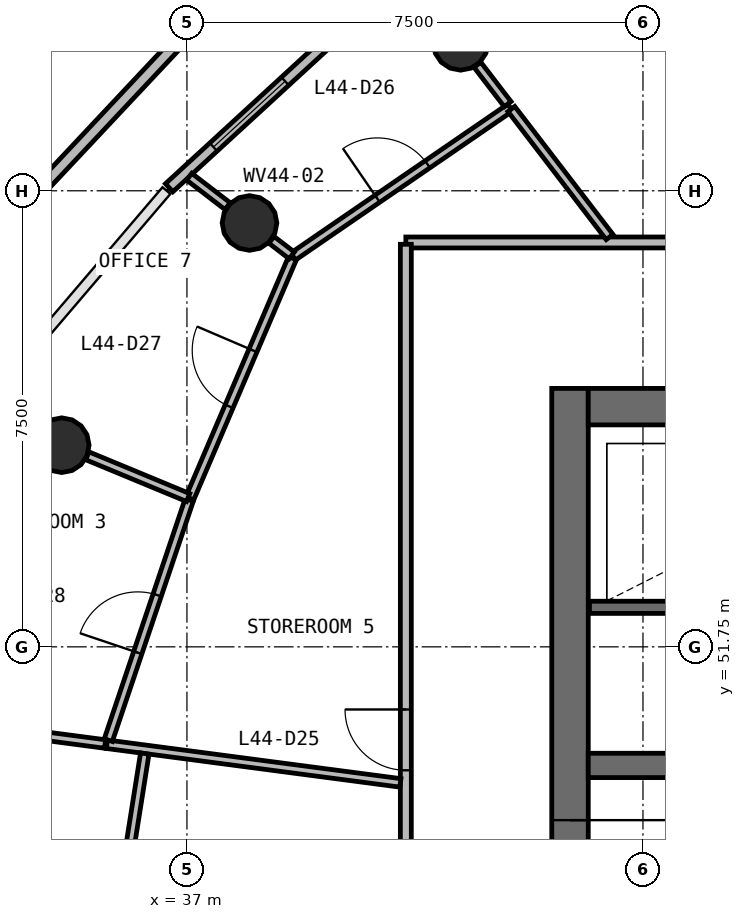
"""IFC4 building model, lengths in metres.
Left out: names, types, materials, properties, quantities, classifications, styles, units other than length and angle.
Written with IfcOpenShell. Run it as: python <this file> out.ifc"""

import sys

from ifc_helpers import new_model, si_unit, direction, frame, frame_2d, origin, origin_2d, place, context, subcontext, project, spatial, rectangle, circle, extrude, source, transform, mapped, element, fill, save


model = new_model("IFC4")
c1 = context("Model", 3, precision=1e-05, world=origin(), true_north=direction((0.0, 1.0)))
c2 = subcontext(c1, "Body", "Model", "MODEL_VIEW")
j1 = project(units=[si_unit("LENGTHUNIT", "METRE"), si_unit("PLANEANGLEUNIT", "RADIAN")], contexts=[c1])
p1 = place(None, origin())
s1 = spatial("IfcSite", under=j1, at=p1, CompositionType="ELEMENT")
p2 = place(p1, origin())
s2 = spatial("IfcBuilding", under=s1, at=p2, CompositionType="ELEMENT")
p3 = place(p2, frame((0.0, 0.0, 183.8)))
s3 = spatial("IfcBuildingStorey", under=s2, at=p3, CompositionType="ELEMENT", Elevation=183.8)
p4 = place(p3, frame((43.3, 56.0, 0.0), z_axis=(0.0, 0.0, 1.0), x_axis=(0.0, -1.0, 0.0)))
e1 = element("IfcWall", 1, at=p4, inside=s3, PredefinedType="SHEAR", context=c2, shape_type="SweptSolid", body=[
    extrude(rectangle(XDim=16.0, YDim=0.6, at=frame_2d((8.0, 0.0))), origin(), (0.0, 0.0, 1.0), 3.9),
])
p5 = place(p4, frame((7.1, 0.0, 0.0)))
e2 = element("IfcOpeningElement", 2, at=p5, cuts=e1, PredefinedType="OPENING", context=c2, shape_type="SweptSolid", body=[
    extrude(rectangle(XDim=1.8, YDim=2.1, at=frame_2d((0.9, 1.05))), frame((0.0, 0.31, 0.0), z_axis=(0.0, -1.0, 0.0), x_axis=(1.0, 0.0, 0.0)), (0.0, 0.0, 1.0), 0.62),
])
p6 = place(p3, frame((60.4, 55.7, 0.0), z_axis=(0.0, 0.0, 1.0), x_axis=(-1.0, 0.0, 0.0)))
e3 = element("IfcWall", 3, at=p6, inside=s3, PredefinedType="SHEAR", context=c2, shape_type="SweptSolid", body=[
    extrude(rectangle(XDim=16.8, YDim=0.6, at=frame_2d((8.4, 0.0))), origin(), (0.0, 0.0, 1.0), 3.9),
])
p7 = place(p6, frame((0.4, 0.0, 0.0)))
e4 = element("IfcOpeningElement", 4, at=p7, cuts=e3, PredefinedType="OPENING", context=c2, shape_type="SweptSolid", body=[
    extrude(rectangle(XDim=1.1, YDim=2.1, at=frame_2d((0.55, 1.05))), frame((0.0, 0.31, 0.0), z_axis=(0.0, -1.0, 0.0), x_axis=(1.0, 0.0, 0.0)), (0.0, 0.0, 1.0), 0.62),
])
p8 = place(p6, frame((10.3, 0.0, 0.0)))
e5 = element("IfcOpeningElement", 5, at=p8, cuts=e3, PredefinedType="OPENING", context=c2, shape_type="SweptSolid", body=[
    extrude(rectangle(XDim=1.2, YDim=2.1, at=frame_2d((0.6, 1.05))), frame((0.0, 0.31, 0.0), z_axis=(0.0, -1.0, 0.0), x_axis=(1.0, 0.0, 0.0)), (0.0, 0.0, 1.0), 0.62),
])
p9 = place(p6, frame((7.25, 0.0, 0.0)))
e6 = element("IfcOpeningElement", 6, at=p9, cuts=e3, PredefinedType="OPENING", context=c2, shape_type="SweptSolid", body=[
    extrude(rectangle(XDim=1.1, YDim=2.1, at=frame_2d((0.55, 1.05))), frame((0.0, 0.31, 0.0), z_axis=(0.0, -1.0, 0.0), x_axis=(1.0, 0.0, 0.0)), (0.0, 0.0, 1.0), 0.62),
])
p10 = place(p3, frame((43.6, 49.8, 0.0), z_axis=(0.0, 0.0, 1.0), x_axis=(1.0, 0.0, 0.0)))
e7 = element("IfcWall", 7, at=p10, inside=s3, PredefinedType="SHEAR", context=c2, shape_type="SweptSolid", body=[
    extrude(rectangle(XDim=16.8, YDim=0.4, at=frame_2d((8.4, 0.0))), origin(), (0.0, 0.0, 1.0), 3.9),
])
p11 = place(p10, frame((9.8, 0.0, 0.0)))
e8 = element("IfcOpeningElement", 8, at=p11, cuts=e7, PredefinedType="OPENING", context=c2, shape_type="SweptSolid", body=[
    extrude(rectangle(XDim=1.1, YDim=2.1, at=frame_2d((0.55, 1.05))), frame((0.0, 0.21, 0.0), z_axis=(0.0, -1.0, 0.0), x_axis=(1.0, 0.0, 0.0)), (0.0, 0.0, 1.0), 0.42),
])
p12 = place(p10, frame((12.3, 0.0, 0.0)))
e9 = element("IfcOpeningElement", 9, at=p12, cuts=e7, PredefinedType="OPENING", context=c2, shape_type="SweptSolid", body=[
    extrude(rectangle(XDim=1.1, YDim=2.1, at=frame_2d((0.55, 1.05))), frame((0.0, 0.21, 0.0), z_axis=(0.0, -1.0, 0.0), x_axis=(1.0, 0.0, 0.0)), (0.0, 0.0, 1.0), 0.42),
])
p13 = place(p10, frame((14.8, 0.0, 0.0)))
e10 = element("IfcOpeningElement", 10, at=p13, cuts=e7, PredefinedType="OPENING", context=c2, shape_type="SweptSolid", body=[
    extrude(rectangle(XDim=1.1, YDim=2.1, at=frame_2d((0.55, 1.05))), frame((0.0, 0.21, 0.0), z_axis=(0.0, -1.0, 0.0), x_axis=(1.0, 0.0, 0.0)), (0.0, 0.0, 1.0), 0.42),
])
p14 = place(p10, frame((4.45, 0.0, 0.0)))
e11 = element("IfcOpeningElement", 11, at=p14, cuts=e7, PredefinedType="OPENING", context=c2, shape_type="SweptSolid", body=[
    extrude(rectangle(XDim=0.9, YDim=2.1, at=frame_2d((0.45, 1.05))), frame((0.0, 0.21, 0.0), z_axis=(0.0, -1.0, 0.0), x_axis=(1.0, 0.0, 0.0)), (0.0, 0.0, 1.0), 0.42),
])
p15 = place(p10, frame((7.85, 0.0, 0.0)))
e12 = element("IfcOpeningElement", 12, at=p15, cuts=e7, PredefinedType="OPENING", context=c2, shape_type="SweptSolid", body=[
    extrude(rectangle(XDim=0.9, YDim=2.1, at=frame_2d((0.45, 1.05))), frame((0.0, 0.21, 0.0), z_axis=(0.0, -1.0, 0.0), x_axis=(1.0, 0.0, 0.0)), (0.0, 0.0, 1.0), 0.42),
])
m1 = source(origin(), c2, "Body", "SweptSolid", [
    extrude(circle(Radius=0.45, at=origin_2d()), origin(), (0.0, 0.0, 1.0), 4.22),
])
for number, where, z_axis, x_axis in (
    (13, (41.501, 61.683, -0.32), (0.0, 0.0, 1.0), (1.0, 0.0, 0.0)),
    (14, (38.029, 58.72, -0.32), (0.0, 0.0, 1.0), (1.0, 0.0, 0.0)),
    (15, (34.941, 55.066, -0.32), (0.0, 0.0, 1.0), (1.0, 0.0, 0.0)),
):
    element("IfcColumn", number, at=place(p3, frame(where, z_axis=z_axis, x_axis=x_axis)), inside=s3, PredefinedType="COLUMN", context=c2, shape_type="MappedRepresentation", body=[
        mapped(m1, transform((0.0, 0.0, 0.0), scale=1.0)),
    ])
p16 = place(p3, frame((39.343, 61.72, 0.0), z_axis=(0.0, 0.0, 1.0), x_axis=(-0.736559026804, -0.67637326975, 0.0)))
e16 = element("IfcWall", 16, at=p16, inside=s3, PredefinedType="STANDARD", context=c2, shape_type="SweptSolid", body=[
    extrude(rectangle(XDim=3.578, YDim=0.18, at=frame_2d((1.789, 0.0))), origin(), (0.0, 0.0, 1.0), 3.58),
])
p17 = place(p16, frame((0.989, 0.0, 0.9)))
e17 = element("IfcOpeningElement", 17, at=p17, cuts=e16, PredefinedType="OPENING", context=c2, shape_type="SweptSolid", body=[
    extrude(rectangle(XDim=1.6, YDim=2.0, at=frame_2d((0.8, 1.0))), frame((0.0, 0.1, 0.0), z_axis=(0.0, -1.0, 0.0), x_axis=(1.0, 0.0, 0.0)), (0.0, 0.0, 1.0), 0.2),
])
p18 = place(p3, frame((33.151, 57.753, 0.0), z_axis=(0.0, 0.0, 1.0), x_axis=(0.684414246662, 0.729093367797, 0.0)))
e18 = element("IfcWall", 18, at=p18, inside=s3, PredefinedType="PARAPET", context=c2, shape_type="SweptSolid", body=[
    extrude(rectangle(XDim=5.869, YDim=0.2, at=frame_2d((2.934, 0.0))), origin(), (0.0, 0.0, 1.0), 1.1),
])
p19 = place(p3, frame((43.62, 52.4, 0.0), z_axis=(0.0, 0.0, 1.0), x_axis=(1.0, 0.0, 0.0)))
e19 = element("IfcWall", 19, at=p19, inside=s3, PredefinedType="SOLIDWALL", context=c2, shape_type="SweptSolid", body=[
    extrude(rectangle(XDim=6.78, YDim=0.2, at=frame_2d((3.39, 0.0))), origin(), (0.0, 0.0, 1.0), 3.58),
])
p20 = place(p3, frame((40.6, 58.4, 0.0), z_axis=(0.0, 0.0, 1.0), x_axis=(1.0, 0.0, 0.0)))
e20 = element("IfcWall", 20, at=p20, inside=s3, PredefinedType="PARTITIONING", context=c2, shape_type="SweptSolid", body=[
    extrude(rectangle(XDim=22.8, YDim=0.18, at=frame_2d((11.4, 0.0))), origin(), (0.0, 0.0, 1.0), 2.88),
])
p21 = place(p20, frame((16.05, 0.0, 0.0)))
e21 = element("IfcOpeningElement", 21, at=p21, cuts=e20, PredefinedType="OPENING", context=c2, shape_type="SweptSolid", body=[
    extrude(rectangle(XDim=0.9, YDim=2.1, at=frame_2d((0.45, 1.05))), frame((0.0, 0.1, 0.0), z_axis=(0.0, -1.0, 0.0), x_axis=(1.0, 0.0, 0.0)), (0.0, 0.0, 1.0), 0.2),
])
p22 = place(p20, frame((13.05, 0.0, 0.0)))
e22 = element("IfcOpeningElement", 22, at=p22, cuts=e20, PredefinedType="OPENING", context=c2, shape_type="SweptSolid", body=[
    extrude(rectangle(XDim=0.9, YDim=2.1, at=frame_2d((0.45, 1.05))), frame((0.0, 0.1, 0.0), z_axis=(0.0, -1.0, 0.0), x_axis=(1.0, 0.0, 0.0)), (0.0, 0.0, 1.0), 0.2),
])
p23 = place(p20, frame((10.95, 0.0, 0.0)))
e23 = element("IfcOpeningElement", 23, at=p23, cuts=e20, PredefinedType="OPENING", context=c2, shape_type="SweptSolid", body=[
    extrude(rectangle(XDim=1.0, YDim=2.1, at=frame_2d((0.5, 1.05))), frame((0.0, 0.1, 0.0), z_axis=(0.0, -1.0, 0.0), x_axis=(1.0, 0.0, 0.0)), (0.0, 0.0, 1.0), 0.2),
])
p24 = place(p3, frame((40.6, 37.63, 0.0), z_axis=(0.0, 0.0, 1.0), x_axis=(0.0, 1.0, 0.0)))
e24 = element("IfcWall", 24, at=p24, inside=s3, PredefinedType="PARTITIONING", context=c2, shape_type="SweptSolid", body=[
    extrude(rectangle(XDim=20.74, YDim=0.18, at=frame_2d((10.37, 0.0))), origin(), (0.0, 0.0, 1.0), 2.88),
])
p25 = place(p24, frame((12.09, 0.0, 0.0)))
e25 = element("IfcOpeningElement", 25, at=p25, cuts=e24, PredefinedType="OPENING", context=c2, shape_type="SweptSolid", body=[
    extrude(rectangle(XDim=1.0, YDim=2.1, at=frame_2d((0.5, 1.05))), frame((0.0, 0.1, 0.0), z_axis=(0.0, -1.0, 0.0), x_axis=(1.0, 0.0, 0.0)), (0.0, 0.0, 1.0), 0.2),
])
p26 = place(p24, frame((9.89, 0.0, 0.0)))
e26 = element("IfcOpeningElement", 26, at=p26, cuts=e24, PredefinedType="OPENING", context=c2, shape_type="SweptSolid", body=[
    extrude(rectangle(XDim=1.0, YDim=2.1, at=frame_2d((0.5, 1.05))), frame((0.0, 0.1, 0.0), z_axis=(0.0, -1.0, 0.0), x_axis=(1.0, 0.0, 0.0)), (0.0, 0.0, 1.0), 0.2),
])
p27 = place(p3, frame((35.684, 50.148, 0.0), z_axis=(0.0, 0.0, 1.0), x_axis=(0.991441658538, -0.130550517866, 0.0)))
e27 = element("IfcWall", 27, at=p27, inside=s3, PredefinedType="PARTITIONING", context=c2, shape_type="SweptSolid", body=[
    extrude(rectangle(XDim=4.868, YDim=0.14, at=frame_2d((2.434, 0.0))), origin(), (0.0, 0.0, 1.0), 2.88),
])
p28 = place(p3, frame((38.747, 58.169, 0.0), z_axis=(0.0, 0.0, 1.0), x_axis=(0.824531922814, 0.565815436569, 0.0)))
e28 = element("IfcWall", 28, at=p28, inside=s3, PredefinedType="PARTITIONING", context=c2, shape_type="SweptSolid", body=[
    extrude(rectangle(XDim=4.33, YDim=0.14, at=frame_2d((2.165, 0.0))), origin(), (0.0, 0.0, 1.0), 2.88),
])
p29 = place(p28, frame((1.68, 0.0, 0.0)))
e29 = element("IfcOpeningElement", 29, at=p29, cuts=e28, PredefinedType="OPENING", context=c2, shape_type="SweptSolid", body=[
    extrude(rectangle(XDim=1.0, YDim=2.1, at=frame_2d((0.5, 1.05))), frame((0.0, 0.08, 0.0), z_axis=(0.0, -1.0, 0.0), x_axis=(1.0, 0.0, 0.0)), (0.0, 0.0, 1.0), 0.16),
])
p30 = place(p3, frame((37.047, 54.194, 0.0), z_axis=(0.0, 0.0, 1.0), x_axis=(0.393178046525, 0.919462355799, 0.0)))
e30 = element("IfcWall", 30, at=p30, inside=s3, PredefinedType="PARTITIONING", context=c2, shape_type="SweptSolid", body=[
    extrude(rectangle(XDim=4.294, YDim=0.14, at=frame_2d((2.147, 0.0))), origin(), (0.0, 0.0, 1.0), 2.88),
])
p31 = place(p30, frame((1.644, 0.0, 0.0)))
e31 = element("IfcOpeningElement", 31, at=p31, cuts=e30, PredefinedType="OPENING", context=c2, shape_type="SweptSolid", body=[
    extrude(rectangle(XDim=1.0, YDim=2.1, at=frame_2d((0.5, 1.05))), frame((0.0, 0.08, 0.0), z_axis=(0.0, -1.0, 0.0), x_axis=(1.0, 0.0, 0.0)), (0.0, 0.0, 1.0), 0.16),
])
p32 = place(p3, frame((35.653, 45.877, 0.0), z_axis=(0.0, 0.0, 1.0), x_axis=(0.15660891281, 0.98766069499, 0.0)))
e32 = element("IfcWall", 32, at=p32, inside=s3, PredefinedType="PARTITIONING", context=c2, shape_type="SweptSolid", body=[
    extrude(rectangle(XDim=4.17, YDim=0.14, at=frame_2d((2.085, 0.0))), origin(), (0.0, 0.0, 1.0), 2.88),
])
p33 = place(p32, frame((1.52, 0.0, 0.0)))
e33 = element("IfcOpeningElement", 33, at=p33, cuts=e32, PredefinedType="OPENING", context=c2, shape_type="SweptSolid", body=[
    extrude(rectangle(XDim=1.0, YDim=2.1, at=frame_2d((0.5, 1.05))), frame((0.0, 0.08, 0.0), z_axis=(0.0, -1.0, 0.0), x_axis=(1.0, 0.0, 0.0)), (0.0, 0.0, 1.0), 0.16),
])
p34 = place(p3, frame((35.707, 50.216, 0.0), z_axis=(0.0, 0.0, 1.0), x_axis=(0.319319104698, 0.947647249442, 0.0)))
e34 = element("IfcWall", 34, at=p34, inside=s3, PredefinedType="PARTITIONING", context=c2, shape_type="SweptSolid", body=[
    extrude(rectangle(XDim=4.168, YDim=0.14, at=frame_2d((2.084, 0.0))), origin(), (0.0, 0.0, 1.0), 2.88),
])
p35 = place(p34, frame((1.518, 0.0, 0.0)))
e35 = element("IfcOpeningElement", 35, at=p35, cuts=e34, PredefinedType="OPENING", context=c2, shape_type="SweptSolid", body=[
    extrude(rectangle(XDim=1.0, YDim=2.1, at=frame_2d((0.5, 1.05))), frame((0.0, 0.08, 0.0), z_axis=(0.0, -1.0, 0.0), x_axis=(1.0, 0.0, 0.0)), (0.0, 0.0, 1.0), 0.16),
])
p36 = place(p3, frame((41.777, 61.323, 0.0), z_axis=(0.0, 0.0, 1.0), x_axis=(0.608670009796, -0.793423480353, 0.0)))
e36 = element("IfcWall", 36, at=p36, inside=s3, PredefinedType="PARTITIONING", context=c2, shape_type="SweptSolid", body=[
    extrude(rectangle(XDim=0.817, YDim=0.14, at=frame_2d((0.408, 0.0))), origin(), (0.0, 0.0, 1.0), 2.88),
])
p37 = place(p3, frame((42.335, 60.595, 0.0), z_axis=(0.0, 0.0, 1.0), x_axis=(0.608723171591, -0.793382694775, 0.0)))
e37 = element("IfcWall", 37, at=p37, inside=s3, PredefinedType="PARTITIONING", context=c2, shape_type="SweptSolid", body=[
    extrude(rectangle(XDim=2.654, YDim=0.14, at=frame_2d((1.327, 0.0))), origin(), (0.0, 0.0, 1.0), 2.88),
])
p38 = place(p3, frame((32.87, 50.519, 0.0), z_axis=(0.0, 0.0, 1.0), x_axis=(0.991450448598, -0.130483746019, 0.0)))
e38 = element("IfcWall", 38, at=p38, inside=s3, PredefinedType="PARTITIONING", context=c2, shape_type="SweptSolid", body=[
    extrude(rectangle(XDim=2.808, YDim=0.14, at=frame_2d((1.404, 0.0))), origin(), (0.0, 0.0, 1.0), 2.88),
])
p39 = place(p3, frame((37.02, 54.205, 0.0), z_axis=(0.0, 0.0, 1.0), x_axis=(-0.923867642226, 0.382712136791, 0.0)))
e39 = element("IfcWall", 39, at=p39, inside=s3, PredefinedType="PARTITIONING", context=c2, shape_type="SweptSolid", body=[
    extrude(rectangle(XDim=1.795, YDim=0.14, at=frame_2d((0.897, 0.0))), origin(), (0.0, 0.0, 1.0), 2.88),
])
p40 = place(p3, frame((37.668, 58.997, 0.0), z_axis=(0.0, 0.0, 1.0), x_axis=(-0.793364436395, 0.608746968011, 0.0)))
e40 = element("IfcWall", 40, at=p40, inside=s3, PredefinedType="PARTITIONING", context=c2, shape_type="SweptSolid", body=[
    extrude(rectangle(XDim=0.796, YDim=0.14, at=frame_2d((0.398, 0.0))), origin(), (0.0, 0.0, 1.0), 2.88),
])
p41 = place(p3, frame((38.723, 58.188, 0.0), z_axis=(0.0, 0.0, 1.0), x_axis=(-0.793335399531, 0.60878480915, 0.0)))
e41 = element("IfcWall", 41, at=p41, inside=s3, PredefinedType="PARTITIONING", context=c2, shape_type="SweptSolid", body=[
    extrude(rectangle(XDim=0.421, YDim=0.14, at=frame_2d((0.21, 0.0))), origin(), (0.0, 0.0, 1.0), 2.88),
])
m2 = source(origin(), c2, "Body", "SweptSolid", [
    extrude(rectangle(XDim=1.6, YDim=2.0, at=frame_2d((0.8, 1.0))), frame((0.0, 0.03, 0.0), z_axis=(0.0, -1.0, 0.0), x_axis=(1.0, 0.0, 0.0)), (0.0, 0.0, 1.0), 0.06),
])
p42 = place(p17, origin())
e42 = element("IfcWindow", 42, at=p42, inside=s3, PartitioningType="SINGLE_PANEL", PredefinedType="WINDOW", context=c2, shape_type="MappedRepresentation", body=[
    mapped(m2, transform((0.0, 0.0, 0.0), scale=1.0)),
])
fill(e17, e42)
m3 = source(origin(), c2, "Body", "SweptSolid", [
    extrude(rectangle(XDim=1.8, YDim=2.1, at=frame_2d((0.9, 1.05))), frame((0.0, 0.025, 0.0), z_axis=(0.0, -1.0, 0.0), x_axis=(1.0, 0.0, 0.0)), (0.0, 0.0, 1.0), 0.05),
])
p43 = place(p5, origin())
e43 = element("IfcDoor", 43, at=p43, inside=s3, OperationType="SINGLE_SWING_LEFT", PredefinedType="DOOR", context=c2, shape_type="MappedRepresentation", body=[
    mapped(m3, transform((0.0, 0.0, 0.0), scale=1.0)),
])
fill(e2, e43)
m4 = source(origin(), c2, "Body", "SweptSolid", [
    extrude(rectangle(XDim=1.0, YDim=2.1, at=frame_2d((0.5, 1.05))), frame((0.0, 0.025, 0.0), z_axis=(0.0, -1.0, 0.0), x_axis=(1.0, 0.0, 0.0)), (0.0, 0.0, 1.0), 0.05),
])
p44 = place(p25, origin())
e44 = element("IfcDoor", 44, at=p44, inside=s3, OperationType="SINGLE_SWING_RIGHT", PredefinedType="DOOR", context=c2, shape_type="MappedRepresentation", body=[
    mapped(m4, transform((0.0, 0.0, 0.0), scale=1.0)),
])
fill(e25, e44)
p45 = place(p29, origin())
e45 = element("IfcDoor", 45, at=p45, inside=s3, OperationType="SINGLE_SWING_LEFT", PredefinedType="DOOR", context=c2, shape_type="MappedRepresentation", body=[
    mapped(m4, transform((0.0, 0.0, 0.0), scale=1.0)),
])
fill(e29, e45)
p46 = place(p31, origin())
e46 = element("IfcDoor", 46, at=p46, inside=s3, OperationType="SINGLE_SWING_RIGHT", PredefinedType="DOOR", context=c2, shape_type="MappedRepresentation", body=[
    mapped(m4, transform((0.0, 0.0, 0.0), scale=1.0)),
])
fill(e31, e46)
p47 = place(p35, origin())
e47 = element("IfcDoor", 47, at=p47, inside=s3, OperationType="SINGLE_SWING_LEFT", PredefinedType="DOOR", context=c2, shape_type="MappedRepresentation", body=[
    mapped(m4, transform((0.0, 0.0, 0.0), scale=1.0)),
])
fill(e35, e47)
save(model, sys.argv[1])
